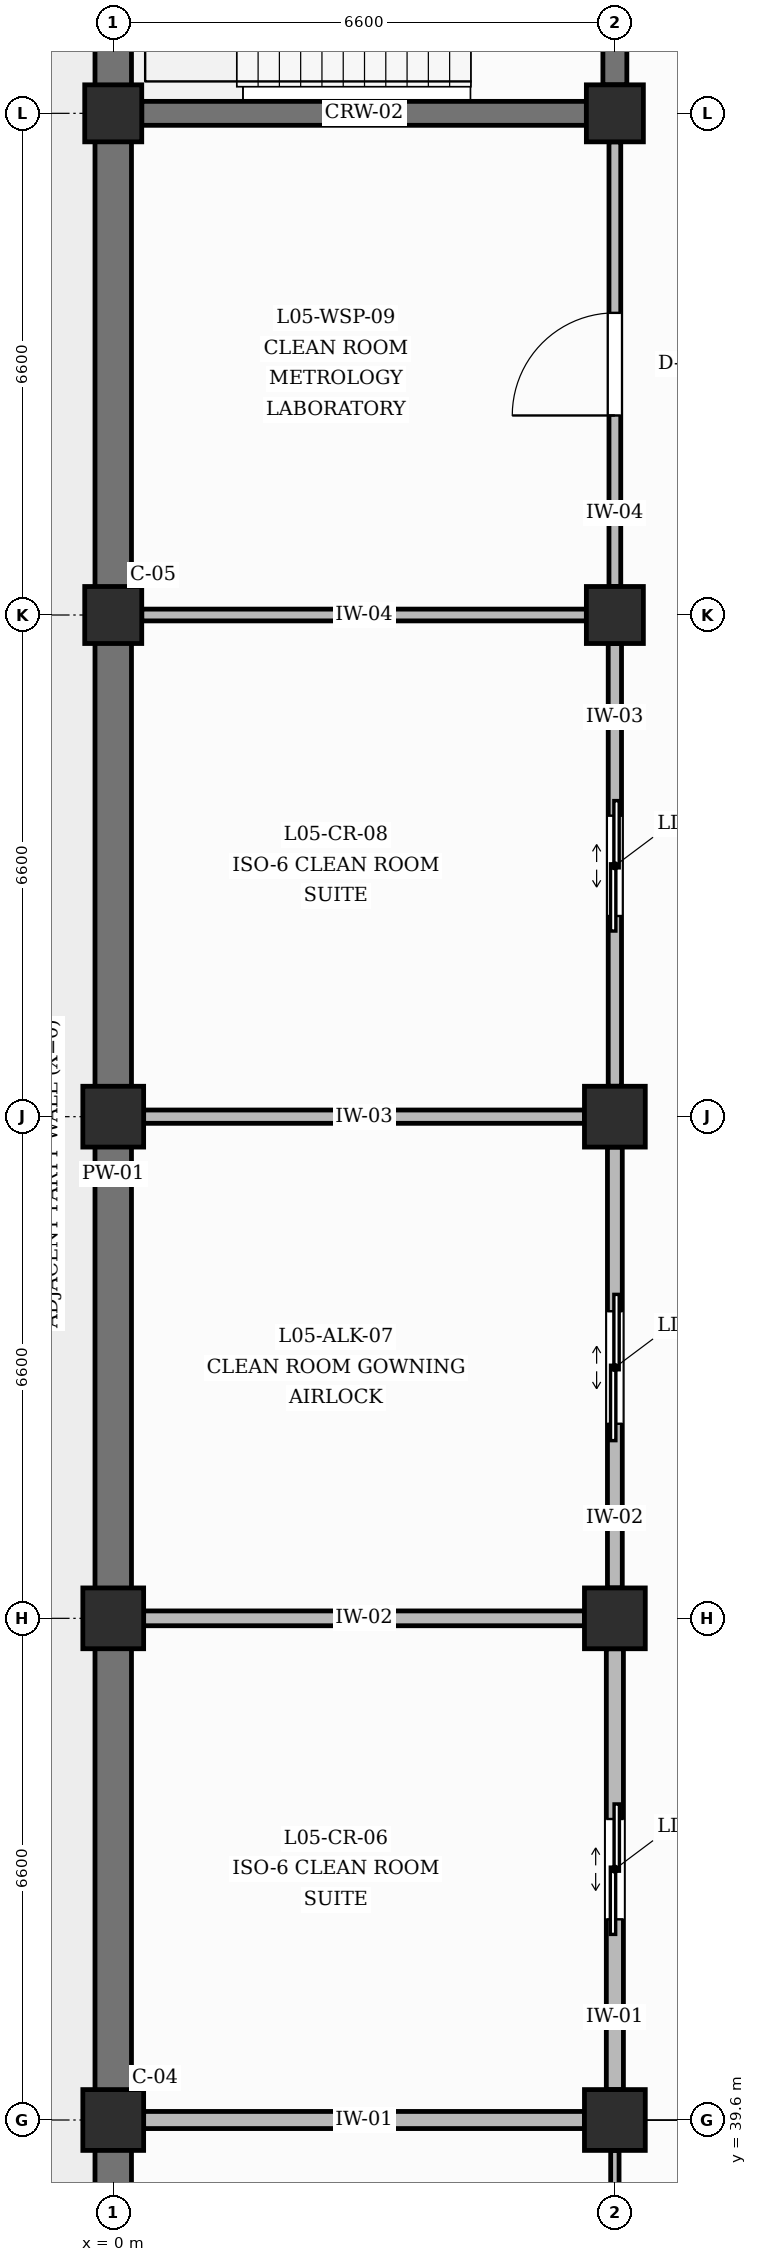
"""IFC4 building model, lengths in metres.
Left out: names, types, materials, properties, quantities, classifications, styles, units other than length and angle.
Written with IfcOpenShell. Run it as: python <this file> out.ifc"""

import sys

from ifc_helpers import new_model, si_unit, direction, frame, frame_2d, origin, origin_2d, place, context, subcontext, project, spatial, rectangle, extrude, element, fill, save


model = new_model("IFC4")
c1 = context("Model", 3, precision=1e-05, world=origin(), true_north=direction((0.0, 1.0)))
c2 = subcontext(c1, "Body", "Model", "MODEL_VIEW")
j1 = project(units=[si_unit("LENGTHUNIT", "METRE"), si_unit("PLANEANGLEUNIT", "RADIAN")], contexts=[c1])
p1 = place(None, origin())
s1 = spatial("IfcSite", under=j1, at=p1, CompositionType="ELEMENT")
p2 = place(p1, origin())
s2 = spatial("IfcBuilding", under=s1, at=p2, CompositionType="ELEMENT")
p3 = place(p2, frame((0.0, 0.0, 22.8)))
s3 = spatial("IfcBuildingStorey", under=s2, at=p3, CompositionType="ELEMENT", Elevation=22.8)
for number, where, z_axis, x_axis in (
    (1, (0.0, 39.6, 0.0), (0.0, 0.0, 1.0), (1.0, 0.0, 0.0)),
    (2, (0.0, 46.2, 0.0), (0.0, 0.0, 1.0), (1.0, 0.0, 0.0)),
    (3, (0.0, 52.8, 0.0), (0.0, 0.0, 1.0), (1.0, 0.0, 0.0)),
):
    element("IfcColumn", number, at=place(p3, frame(where, z_axis=z_axis, x_axis=x_axis)), inside=s3, PredefinedType="COLUMN", context=c2, shape_type="SweptSolid", body=[
        extrude(rectangle(XDim=0.8, YDim=0.8, at=origin_2d()), origin(), (0.0, 0.0, 1.0), 4.2),
    ])
for number, where, z_axis, x_axis in (
    (4, (0.0, 59.4, 0.0), (0.0, 0.0, 1.0), (1.0, 0.0, 0.0)),
    (5, (0.0, 66.0, 0.0), (0.0, 0.0, 1.0), (1.0, 0.0, 0.0)),
):
    element("IfcColumn", number, at=place(p3, frame(where, z_axis=z_axis, x_axis=x_axis)), inside=s3, PredefinedType="COLUMN", context=c2, shape_type="SweptSolid", body=[
        extrude(rectangle(XDim=0.75, YDim=0.75, at=origin_2d()), origin(), (0.0, 0.0, 1.0), 4.2),
    ])
for number, where, z_axis, x_axis in (
    (6, (6.6, 39.6, 0.0), (0.0, 0.0, 1.0), (1.0, 0.0, 0.0)),
    (7, (6.6, 46.2, 0.0), (0.0, 0.0, 1.0), (1.0, 0.0, 0.0)),
    (8, (6.6, 52.8, 0.0), (0.0, 0.0, 1.0), (1.0, 0.0, 0.0)),
):
    element("IfcColumn", number, at=place(p3, frame(where, z_axis=z_axis, x_axis=x_axis)), inside=s3, PredefinedType="COLUMN", context=c2, shape_type="SweptSolid", body=[
        extrude(rectangle(XDim=0.8, YDim=0.8, at=origin_2d()), origin(), (0.0, 0.0, 1.0), 4.2),
    ])
for number, where, z_axis, x_axis in (
    (9, (6.6, 59.4, 0.0), (0.0, 0.0, 1.0), (1.0, 0.0, 0.0)),
    (10, (6.6, 66.0, 0.0), (0.0, 0.0, 1.0), (1.0, 0.0, 0.0)),
):
    element("IfcColumn", number, at=place(p3, frame(where, z_axis=z_axis, x_axis=x_axis)), inside=s3, PredefinedType="COLUMN", context=c2, shape_type="SweptSolid", body=[
        extrude(rectangle(XDim=0.75, YDim=0.75, at=origin_2d()), origin(), (0.0, 0.0, 1.0), 4.2),
    ])
for number, where, z_axis, x_axis in (
    (11, (0.0, 33.4, 0.0), (0.0, 0.0, 1.0), (0.0, 1.0, 0.0)),
    (12, (0.0, 40.0, 0.0), (0.0, 0.0, 1.0), (0.0, 1.0, 0.0)),
):
    element("IfcWall", number, at=place(p3, frame(where, z_axis=z_axis, x_axis=x_axis)), inside=s3, PredefinedType="SOLIDWALL", context=c2, shape_type="SweptSolid", body=[
        extrude(rectangle(XDim=5.8, YDim=0.48, at=frame_2d((2.9, 0.0))), origin(), (0.0, 0.0, 1.0), 3.27),
    ])
p4 = place(p3, frame((0.0, 46.6, 0.0), z_axis=(0.0, 0.0, 1.0), x_axis=(0.0, 1.0, 0.0)))
e13 = element("IfcWall", 13, at=p4, inside=s3, PredefinedType="SOLIDWALL", context=c2, shape_type="SweptSolid", body=[
    extrude(rectangle(XDim=5.8, YDim=0.48, at=frame_2d((2.9, 0.0))), origin(), (0.0, 0.0, 1.0), 3.27),
])
p5 = place(p3, frame((0.0, 53.2, 0.0), z_axis=(0.0, 0.0, 1.0), x_axis=(0.0, 1.0, 0.0)))
e14 = element("IfcWall", 14, at=p5, inside=s3, PredefinedType="SOLIDWALL", context=c2, shape_type="SweptSolid", body=[
    extrude(rectangle(XDim=5.825, YDim=0.48, at=frame_2d((2.913, 0.0))), origin(), (0.0, 0.0, 1.0), 3.27),
])
for number, where, z_axis, x_axis in (
    (15, (0.0, 59.775, 0.0), (0.0, 0.0, 1.0), (0.0, 1.0, 0.0)),
    (16, (0.0, 66.375, 0.0), (0.0, 0.0, 1.0), (0.0, 1.0, 0.0)),
):
    element("IfcWall", number, at=place(p3, frame(where, z_axis=z_axis, x_axis=x_axis)), inside=s3, PredefinedType="SOLIDWALL", context=c2, shape_type="SweptSolid", body=[
        extrude(rectangle(XDim=5.85, YDim=0.48, at=frame_2d((2.925, 0.0))), origin(), (0.0, 0.0, 1.0), 3.27),
    ])
p6 = place(p3, frame((0.375, 66.0, 0.0), z_axis=(0.0, 0.0, 1.0), x_axis=(1.0, 0.0, 0.0)))
e17 = element("IfcWall", 17, at=p6, inside=s3, PredefinedType="SHEAR", context=c2, shape_type="SweptSolid", body=[
    extrude(rectangle(XDim=5.85, YDim=0.315, at=frame_2d((2.925, 0.0))), origin(), (0.0, 0.0, 1.0), 3.17),
])
p7 = place(p3, frame((6.6, 66.375, 0.0), z_axis=(0.0, 0.0, 1.0), x_axis=(0.0, 1.0, 0.0)))
e18 = element("IfcWall", 18, at=p7, inside=s3, PredefinedType="SHEAR", context=c2, shape_type="SweptSolid", body=[
    extrude(rectangle(XDim=5.85, YDim=0.315, at=frame_2d((2.925, 0.0))), origin(), (0.0, 0.0, 1.0), 3.17),
])
p8 = place(p7, frame((2.375, 0.0, 0.0)))
e19 = element("IfcOpeningElement", 19, at=p8, cuts=e18, PredefinedType="OPENING", context=c2, shape_type="SweptSolid", body=[
    extrude(rectangle(XDim=1.1, YDim=2.15, at=frame_2d((0.55, 1.075))), frame((0.0, 0.167, 0.0), z_axis=(0.0, -1.0, 0.0), x_axis=(1.0, 0.0, 0.0)), (0.0, 0.0, 1.0), 0.335),
])
p9 = place(p3, frame((6.6, 33.4, 0.0), z_axis=(0.0, 0.0, 1.0), x_axis=(0.0, 1.0, 0.0)))
e20 = element("IfcWall", 20, at=p9, inside=s3, PredefinedType="PARTITIONING", context=c2, shape_type="SweptSolid", body=[
    extrude(rectangle(XDim=5.8, YDim=0.11, at=frame_2d((2.9, 0.0))), origin(), (0.0, 0.0, 1.0), 3.17),
])
p10 = place(p9, frame((2.16, 0.0, 0.0)))
e21 = element("IfcOpeningElement", 21, at=p10, cuts=e20, PredefinedType="OPENING", context=c2, shape_type="SweptSolid", body=[
    extrude(rectangle(XDim=1.48, YDim=2.25, at=frame_2d((0.74, 1.125))), frame((0.0, 0.065, 0.0), z_axis=(0.0, -1.0, 0.0), x_axis=(1.0, 0.0, 0.0)), (0.0, 0.0, 1.0), 0.13),
])
p11 = place(p3, frame((0.4, 39.6, 0.0), z_axis=(0.0, 0.0, 1.0), x_axis=(1.0, 0.0, 0.0)))
e22 = element("IfcWall", 22, at=p11, inside=s3, PredefinedType="PARTITIONING", context=c2, shape_type="SweptSolid", body=[
    extrude(rectangle(XDim=5.8, YDim=0.225, at=frame_2d((2.9, 0.0))), origin(), (0.0, 0.0, 1.0), 3.17),
])
p12 = place(p3, frame((6.6, 40.0, 0.0), z_axis=(0.0, 0.0, 1.0), x_axis=(0.0, 1.0, 0.0)))
e23 = element("IfcWall", 23, at=p12, inside=s3, PredefinedType="PARTITIONING", context=c2, shape_type="SweptSolid", body=[
    extrude(rectangle(XDim=5.8, YDim=0.225, at=frame_2d((2.9, 0.0))), origin(), (0.0, 0.0, 1.0), 3.17),
])
p13 = place(p12, frame((2.24, 0.0, 0.0)))
e24 = element("IfcOpeningElement", 24, at=p13, cuts=e23, PredefinedType="OPENING", context=c2, shape_type="SweptSolid", body=[
    extrude(rectangle(XDim=1.32, YDim=2.2, at=frame_2d((0.66, 1.1))), frame((0.0, 0.123, 0.0), z_axis=(0.0, -1.0, 0.0), x_axis=(1.0, 0.0, 0.0)), (0.0, 0.0, 1.0), 0.245),
])
p14 = place(p3, frame((0.4, 46.2, 0.0), z_axis=(0.0, 0.0, 1.0), x_axis=(1.0, 0.0, 0.0)))
e25 = element("IfcWall", 25, at=p14, inside=s3, PredefinedType="PARTITIONING", context=c2, shape_type="SweptSolid", body=[
    extrude(rectangle(XDim=5.8, YDim=0.195, at=frame_2d((2.9, 0.0))), origin(), (0.0, 0.0, 1.0), 3.17),
])
p15 = place(p3, frame((6.6, 46.6, 0.0), z_axis=(0.0, 0.0, 1.0), x_axis=(0.0, 1.0, 0.0)))
e26 = element("IfcWall", 26, at=p15, inside=s3, PredefinedType="PARTITIONING", context=c2, shape_type="SweptSolid", body=[
    extrude(rectangle(XDim=5.8, YDim=0.195, at=frame_2d((2.9, 0.0))), origin(), (0.0, 0.0, 1.0), 3.17),
])
p16 = place(p15, frame((2.16, 0.0, 0.0)))
e27 = element("IfcOpeningElement", 27, at=p16, cuts=e26, PredefinedType="OPENING", context=c2, shape_type="SweptSolid", body=[
    extrude(rectangle(XDim=1.48, YDim=2.25, at=frame_2d((0.74, 1.125))), frame((0.0, 0.107, 0.0), z_axis=(0.0, -1.0, 0.0), x_axis=(1.0, 0.0, 0.0)), (0.0, 0.0, 1.0), 0.215),
])
p17 = place(p3, frame((0.4, 52.8, 0.0), z_axis=(0.0, 0.0, 1.0), x_axis=(1.0, 0.0, 0.0)))
e28 = element("IfcWall", 28, at=p17, inside=s3, PredefinedType="PARTITIONING", context=c2, shape_type="SweptSolid", body=[
    extrude(rectangle(XDim=5.8, YDim=0.175, at=frame_2d((2.9, 0.0))), origin(), (0.0, 0.0, 1.0), 3.17),
])
p18 = place(p3, frame((6.6, 53.2, 0.0), z_axis=(0.0, 0.0, 1.0), x_axis=(0.0, 1.0, 0.0)))
e29 = element("IfcWall", 29, at=p18, inside=s3, PredefinedType="PARTITIONING", context=c2, shape_type="SweptSolid", body=[
    extrude(rectangle(XDim=5.825, YDim=0.175, at=frame_2d((2.913, 0.0))), origin(), (0.0, 0.0, 1.0), 3.17),
])
p19 = place(p18, frame((2.24, 0.0, 0.0)))
e30 = element("IfcOpeningElement", 30, at=p19, cuts=e29, PredefinedType="OPENING", context=c2, shape_type="SweptSolid", body=[
    extrude(rectangle(XDim=1.32, YDim=2.2, at=frame_2d((0.66, 1.1))), frame((0.0, 0.097, 0.0), z_axis=(0.0, -1.0, 0.0), x_axis=(1.0, 0.0, 0.0)), (0.0, 0.0, 1.0), 0.195),
])
p20 = place(p3, frame((0.375, 59.4, 0.0), z_axis=(0.0, 0.0, 1.0), x_axis=(1.0, 0.0, 0.0)))
e31 = element("IfcWall", 31, at=p20, inside=s3, PredefinedType="PARTITIONING", context=c2, shape_type="SweptSolid", body=[
    extrude(rectangle(XDim=5.85, YDim=0.155, at=frame_2d((2.925, 0.0))), origin(), (0.0, 0.0, 1.0), 3.17),
])
p21 = place(p3, frame((6.6, 59.775, 0.0), z_axis=(0.0, 0.0, 1.0), x_axis=(0.0, 1.0, 0.0)))
e32 = element("IfcWall", 32, at=p21, inside=s3, PredefinedType="PARTITIONING", context=c2, shape_type="SweptSolid", body=[
    extrude(rectangle(XDim=5.85, YDim=0.155, at=frame_2d((2.925, 0.0))), origin(), (0.0, 0.0, 1.0), 3.17),
])
p22 = place(p21, frame((2.25, 0.0, 0.0)))
e33 = element("IfcOpeningElement", 33, at=p22, cuts=e32, PredefinedType="OPENING", context=c2, shape_type="SweptSolid", body=[
    extrude(rectangle(XDim=1.35, YDim=2.3, at=frame_2d((0.675, 1.15))), frame((0.0, 0.087, 0.0), z_axis=(0.0, -1.0, 0.0), x_axis=(1.0, 0.0, 0.0)), (0.0, 0.0, 1.0), 0.175),
])
p23 = place(p13, origin())
e34 = element("IfcDoor", 34, at=p23, inside=s3, OperationType="DOUBLE_DOOR_SLIDING", PredefinedType="USERDEFINED", context=c2, shape_type="SweptSolid", body=[
    extrude(rectangle(XDim=1.32, YDim=2.2, at=frame_2d((0.66, 1.1))), frame((0.0, 0.025, 0.0), z_axis=(0.0, -1.0, 0.0), x_axis=(1.0, 0.0, 0.0)), (0.0, 0.0, 1.0), 0.05),
])
fill(e24, e34)
p24 = place(p16, origin())
e35 = element("IfcDoor", 35, at=p24, inside=s3, OperationType="DOUBLE_DOOR_SLIDING", PredefinedType="USERDEFINED", context=c2, shape_type="SweptSolid", body=[
    extrude(rectangle(XDim=1.48, YDim=2.25, at=frame_2d((0.74, 1.125))), frame((0.0, 0.025, 0.0), z_axis=(0.0, -1.0, 0.0), x_axis=(1.0, 0.0, 0.0)), (0.0, 0.0, 1.0), 0.05),
])
fill(e27, e35)
p25 = place(p19, origin())
e36 = element("IfcDoor", 36, at=p25, inside=s3, OperationType="DOUBLE_DOOR_SLIDING", PredefinedType="USERDEFINED", context=c2, shape_type="SweptSolid", body=[
    extrude(rectangle(XDim=1.32, YDim=2.2, at=frame_2d((0.66, 1.1))), frame((0.0, 0.025, 0.0), z_axis=(0.0, -1.0, 0.0), x_axis=(1.0, 0.0, 0.0)), (0.0, 0.0, 1.0), 0.05),
])
fill(e30, e36)
p26 = place(p22, origin())
e37 = element("IfcDoor", 37, at=p26, inside=s3, OperationType="SINGLE_SWING_LEFT", PredefinedType="DOOR", context=c2, shape_type="SweptSolid", body=[
    extrude(rectangle(XDim=1.35, YDim=2.3, at=frame_2d((0.675, 1.15))), frame((0.0, 0.025, 0.0), z_axis=(0.0, -1.0, 0.0), x_axis=(1.0, 0.0, 0.0)), (0.0, 0.0, 1.0), 0.05),
])
fill(e33, e37)
save(model, sys.argv[1])
